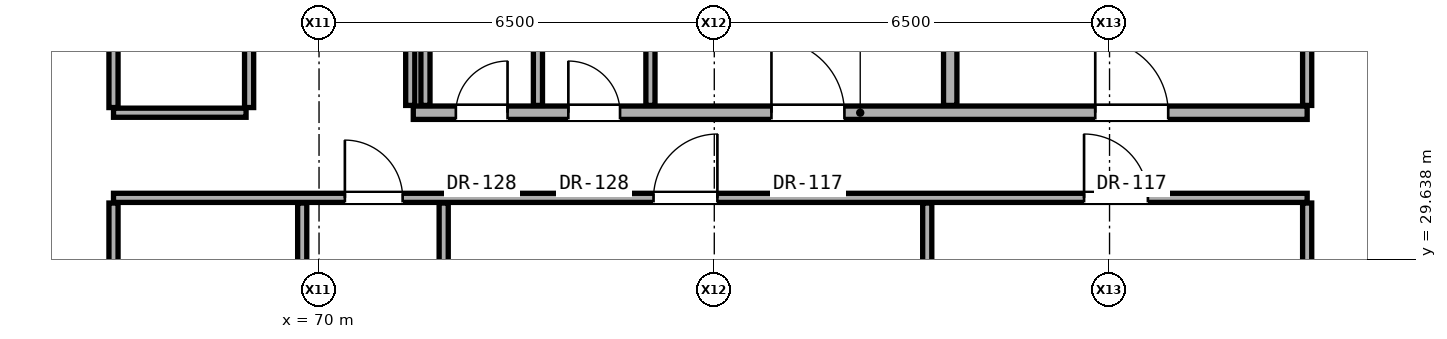
"""IFC4 building model, lengths in metres.
Left out: names, types, materials, properties, quantities, classifications, styles, units other than length and angle.
Written with IfcOpenShell. Run it as: python <this file> out.ifc"""

import sys

from ifc_helpers import new_model, si_unit, direction, frame, frame_2d, origin, place, context, subcontext, project, spatial, rectangle, extrude, element, fill, save


model = new_model("IFC4")
c1 = context("Model", 3, precision=1e-05, world=origin(), true_north=direction((0.0, 1.0)))
c2 = subcontext(c1, "Body", "Model", "MODEL_VIEW")
j1 = project(units=[si_unit("LENGTHUNIT", "METRE"), si_unit("PLANEANGLEUNIT", "RADIAN")], contexts=[c1])
p1 = place(None, origin())
s1 = spatial("IfcSite", under=j1, at=p1, CompositionType="ELEMENT")
p2 = place(p1, origin())
s2 = spatial("IfcBuilding", under=s1, at=p2, CompositionType="ELEMENT")
p3 = place(p2, frame((0.0, 0.0, 78.5)))
s3 = spatial("IfcBuildingStorey", under=s2, at=p3, CompositionType="ELEMENT", Elevation=78.5)
p4 = place(p3, frame((66.62, 30.65, 0.0), z_axis=(0.0, 0.0, 1.0), x_axis=(1.0, 0.0, 0.0)))
e1 = element("IfcWall", 1, at=p4, inside=s3, PredefinedType="PARTITIONING", context=c2, shape_type="SweptSolid", body=[
    extrude(rectangle(XDim=19.63, YDim=0.15, at=frame_2d((9.815, 0.0))), origin(), (0.0, 0.0, 1.0), 2.316),
])
p5 = place(p4, frame((3.805, 0.0, 0.0)))
e2 = element("IfcOpeningElement", 2, at=p5, cuts=e1, PredefinedType="OPENING", context=c2, shape_type="SweptSolid", body=[
    extrude(rectangle(XDim=0.95, YDim=2.15, at=frame_2d((0.475, 1.075))), frame((0.0, 0.085, 0.0), z_axis=(0.0, -1.0, 0.0), x_axis=(1.0, 0.0, 0.0)), (0.0, 0.0, 1.0), 0.17),
])
p6 = place(p4, frame((8.881, 0.0, 0.0)))
e3 = element("IfcOpeningElement", 3, at=p6, cuts=e1, PredefinedType="OPENING", context=c2, shape_type="SweptSolid", body=[
    extrude(rectangle(XDim=1.05, YDim=2.2, at=frame_2d((0.525, 1.1))), frame((0.0, 0.085, 0.0), z_axis=(0.0, -1.0, 0.0), x_axis=(1.0, 0.0, 0.0)), (0.0, 0.0, 1.0), 0.17),
])
p7 = place(p4, frame((15.961, 0.0, 0.0)))
e4 = element("IfcOpeningElement", 4, at=p7, cuts=e1, PredefinedType="OPENING", context=c2, shape_type="SweptSolid", body=[
    extrude(rectangle(XDim=1.05, YDim=2.2, at=frame_2d((0.525, 1.1))), frame((0.0, 0.085, 0.0), z_axis=(0.0, -1.0, 0.0), x_axis=(1.0, 0.0, 0.0)), (0.0, 0.0, 1.0), 0.17),
])
p8 = place(p3, frame((66.62, 32.05, 0.0), z_axis=(0.0, 0.0, 1.0), x_axis=(1.0, 0.0, 0.0)))
e5 = element("IfcWall", 5, at=p8, inside=s3, PredefinedType="PARTITIONING", context=c2, shape_type="SweptSolid", body=[
    extrude(rectangle(XDim=2.18, YDim=0.15, at=frame_2d((1.09, 0.0))), origin(), (0.0, 0.0, 1.0), 2.316),
])
p9 = place(p3, frame((71.55, 32.05, 0.0), z_axis=(0.0, 0.0, 1.0), x_axis=(1.0, 0.0, 0.0)))
e6 = element("IfcWall", 6, at=p9, inside=s3, PredefinedType="SOLIDWALL", context=c2, shape_type="SweptSolid", body=[
    extrude(rectangle(XDim=14.7, YDim=0.22, at=frame_2d((7.35, 0.0))), origin(), (0.0, 0.0, 1.0), 2.316),
])
p10 = place(p9, frame((11.215, 0.0, 0.0)))
e7 = element("IfcOpeningElement", 7, at=p10, cuts=e6, PredefinedType="OPENING", context=c2, shape_type="SweptSolid", body=[
    extrude(rectangle(XDim=1.2, YDim=2.25, at=frame_2d((0.6, 1.125))), frame((0.0, 0.12, 0.0), z_axis=(0.0, -1.0, 0.0), x_axis=(1.0, 0.0, 0.0)), (0.0, 0.0, 1.0), 0.24),
])
p11 = place(p9, frame((5.89, 0.0, 0.0)))
e8 = element("IfcOpeningElement", 8, at=p11, cuts=e6, PredefinedType="OPENING", context=c2, shape_type="SweptSolid", body=[
    extrude(rectangle(XDim=1.2, YDim=2.25, at=frame_2d((0.6, 1.125))), frame((0.0, 0.12, 0.0), z_axis=(0.0, -1.0, 0.0), x_axis=(1.0, 0.0, 0.0)), (0.0, 0.0, 1.0), 0.24),
])
p12 = place(p9, frame((0.7, 0.0, 0.0)))
e9 = element("IfcOpeningElement", 9, at=p12, cuts=e6, PredefinedType="OPENING", context=c2, shape_type="SweptSolid", body=[
    extrude(rectangle(XDim=0.85, YDim=2.01, at=frame_2d((0.425, 1.005))), frame((0.0, 0.12, 0.0), z_axis=(0.0, -1.0, 0.0), x_axis=(1.0, 0.0, 0.0)), (0.0, 0.0, 1.0), 0.24),
])
p13 = place(p9, frame((2.55, 0.0, 0.0)))
e10 = element("IfcOpeningElement", 10, at=p13, cuts=e6, PredefinedType="OPENING", context=c2, shape_type="SweptSolid", body=[
    extrude(rectangle(XDim=0.85, YDim=2.01, at=frame_2d((0.425, 1.005))), frame((0.0, 0.12, 0.0), z_axis=(0.0, -1.0, 0.0), x_axis=(1.0, 0.0, 0.0)), (0.0, 0.0, 1.0), 0.24),
])
p14 = place(p3, frame((66.62, 24.935, 0.0), z_axis=(0.0, 0.0, 1.0), x_axis=(0.0, 1.0, 0.0)))
e11 = element("IfcWall", 11, at=p14, inside=s3, PredefinedType="PARTITIONING", context=c2, shape_type="SweptSolid", body=[
    extrude(rectangle(XDim=5.63, YDim=0.15, at=frame_2d((2.815, 0.0))), origin(), (0.0, 0.0, 1.0), 2.316),
])
p15 = place(p14, frame((2.34, 0.0, 0.0)))
e12 = element("IfcOpeningElement", 12, at=p15, cuts=e11, PredefinedType="OPENING", context=c2, shape_type="SweptSolid", body=[
    extrude(rectangle(XDim=0.95, YDim=2.15, at=frame_2d((0.475, 1.075))), frame((0.0, 0.085, 0.0), z_axis=(0.0, -1.0, 0.0), x_axis=(1.0, 0.0, 0.0)), (0.0, 0.0, 1.0), 0.17),
])
p16 = place(p3, frame((66.62, 32.135, 0.0), z_axis=(0.0, 0.0, 1.0), x_axis=(0.0, 1.0, 0.0)))
e13 = element("IfcWall", 13, at=p16, inside=s3, PredefinedType="PARTITIONING", context=c2, shape_type="SweptSolid", body=[
    extrude(rectangle(XDim=3.48, YDim=0.15, at=frame_2d((1.74, 0.0))), origin(), (0.0, 0.0, 1.0), 2.332),
])
p17 = place(p3, frame((68.85, 32.135, 0.0), z_axis=(0.0, 0.0, 1.0), x_axis=(0.0, 1.0, 0.0)))
e14 = element("IfcWall", 14, at=p17, inside=s3, PredefinedType="PARTITIONING", context=c2, shape_type="SweptSolid", body=[
    extrude(rectangle(XDim=2.745, YDim=0.15, at=frame_2d((1.373, 0.0))), origin(), (0.0, 0.0, 1.0), 2.94),
])
p18 = place(p3, frame((69.723, 24.935, 0.0), z_axis=(0.0, 0.0, 1.0), x_axis=(0.0, 1.0, 0.0)))
e15 = element("IfcWall", 15, at=p18, inside=s3, PredefinedType="PARTITIONING", context=c2, shape_type="SweptSolid", body=[
    extrude(rectangle(XDim=5.63, YDim=0.15, at=frame_2d((2.815, 0.0))), origin(), (0.0, 0.0, 1.0), 2.316),
])
for number, where, z_axis, x_axis in (
    (16, (71.5, 32.17, 0.0), (0.0, 0.0, 1.0), (0.0, 1.0, 0.0)),
    (17, (71.75, 32.17, 0.0), (0.0, 0.0, 1.0), (0.0, 1.0, 0.0)),
):
    element("IfcWall", number, at=place(p3, frame(where, z_axis=z_axis, x_axis=x_axis)), inside=s3, PredefinedType="PARTITIONING", context=c2, shape_type="SweptSolid", body=[
        extrude(rectangle(XDim=2.71, YDim=0.15, at=frame_2d((1.355, 0.0))), origin(), (0.0, 0.0, 1.0), 2.94),
    ])
p19 = place(p3, frame((72.05, 26.17, 0.0), z_axis=(0.0, 0.0, 1.0), x_axis=(0.0, 1.0, 0.0)))
e18 = element("IfcWall", 18, at=p19, inside=s3, PredefinedType="PARTITIONING", context=c2, shape_type="SweptSolid", body=[
    extrude(rectangle(XDim=4.395, YDim=0.15, at=frame_2d((2.198, 0.0))), origin(), (0.0, 0.0, 1.0), 2.316),
])
for number, where, z_axis, x_axis in (
    (19, (73.6, 32.17, 0.0), (0.0, 0.0, 1.0), (0.0, 1.0, 0.0)),
    (20, (75.45, 32.17, 0.0), (0.0, 0.0, 1.0), (0.0, 1.0, 0.0)),
):
    element("IfcWall", number, at=place(p3, frame(where, z_axis=z_axis, x_axis=x_axis)), inside=s3, PredefinedType="PARTITIONING", context=c2, shape_type="SweptSolid", body=[
        extrude(rectangle(XDim=2.71, YDim=0.15, at=frame_2d((1.355, 0.0))), origin(), (0.0, 0.0, 1.0), 2.94),
    ])
p20 = place(p3, frame((80.002, 26.17, 0.0), z_axis=(0.0, 0.0, 1.0), x_axis=(0.0, 1.0, 0.0)))
e21 = element("IfcWall", 21, at=p20, inside=s3, PredefinedType="PARTITIONING", context=c2, shape_type="SweptSolid", body=[
    extrude(rectangle(XDim=4.395, YDim=0.15, at=frame_2d((2.198, 0.0))), origin(), (0.0, 0.0, 1.0), 2.316),
])
p21 = place(p3, frame((80.38, 32.17, 0.0), z_axis=(0.0, 0.0, 1.0), x_axis=(0.0, 1.0, 0.0)))
e22 = element("IfcWall", 22, at=p21, inside=s3, PredefinedType="SOLIDWALL", context=c2, shape_type="SweptSolid", body=[
    extrude(rectangle(XDim=2.71, YDim=0.22, at=frame_2d((1.355, 0.0))), origin(), (0.0, 0.0, 1.0), 2.94),
])
p22 = place(p3, frame((86.25, 26.17, 0.0), z_axis=(0.0, 0.0, 1.0), x_axis=(0.0, 1.0, 0.0)))
e23 = element("IfcWall", 23, at=p22, inside=s3, PredefinedType="PARTITIONING", context=c2, shape_type="SweptSolid", body=[
    extrude(rectangle(XDim=4.395, YDim=0.15, at=frame_2d((2.198, 0.0))), origin(), (0.0, 0.0, 1.0), 2.316),
])
p23 = place(p3, frame((86.25, 32.17, 0.0), z_axis=(0.0, 0.0, 1.0), x_axis=(0.0, 1.0, 0.0)))
e24 = element("IfcWall", 24, at=p23, inside=s3, PredefinedType="PARTITIONING", context=c2, shape_type="SweptSolid", body=[
    extrude(rectangle(XDim=2.795, YDim=0.15, at=frame_2d((1.397, 0.0))), origin(), (0.0, 0.0, 1.0), 2.332),
])
p24 = place(p10, origin())
e25 = element("IfcDoor", 25, at=p24, inside=s3, OperationType="SINGLE_SWING_LEFT", PredefinedType="DOOR", context=c2, shape_type="SweptSolid", body=[
    extrude(rectangle(XDim=1.2, YDim=2.25, at=frame_2d((0.6, 1.125))), frame((0.0, 0.025, 0.0), z_axis=(0.0, -1.0, 0.0), x_axis=(1.0, 0.0, 0.0)), (0.0, 0.0, 1.0), 0.05),
])
fill(e7, e25)
p25 = place(p11, origin())
e26 = element("IfcDoor", 26, at=p25, inside=s3, OperationType="SINGLE_SWING_LEFT", PredefinedType="DOOR", context=c2, shape_type="SweptSolid", body=[
    extrude(rectangle(XDim=1.2, YDim=2.25, at=frame_2d((0.6, 1.125))), frame((0.0, 0.025, 0.0), z_axis=(0.0, -1.0, 0.0), x_axis=(1.0, 0.0, 0.0)), (0.0, 0.0, 1.0), 0.05),
])
fill(e8, e26)
p26 = place(p12, origin())
e27 = element("IfcDoor", 27, at=p26, inside=s3, OperationType="SINGLE_SWING_RIGHT", PredefinedType="DOOR", context=c2, shape_type="SweptSolid", body=[
    extrude(rectangle(XDim=0.85, YDim=2.01, at=frame_2d((0.425, 1.005))), frame((0.0, 0.025, 0.0), z_axis=(0.0, -1.0, 0.0), x_axis=(1.0, 0.0, 0.0)), (0.0, 0.0, 1.0), 0.05),
])
fill(e9, e27)
p27 = place(p13, origin())
e28 = element("IfcDoor", 28, at=p27, inside=s3, OperationType="SINGLE_SWING_LEFT", PredefinedType="DOOR", context=c2, shape_type="SweptSolid", body=[
    extrude(rectangle(XDim=0.85, YDim=2.01, at=frame_2d((0.425, 1.005))), frame((0.0, 0.025, 0.0), z_axis=(0.0, -1.0, 0.0), x_axis=(1.0, 0.0, 0.0)), (0.0, 0.0, 1.0), 0.05),
])
fill(e10, e28)
p28 = place(p5, origin())
e29 = element("IfcDoor", 29, at=p28, inside=s3, OperationType="SINGLE_SWING_LEFT", PredefinedType="DOOR", context=c2, shape_type="SweptSolid", body=[
    extrude(rectangle(XDim=0.95, YDim=2.15, at=frame_2d((0.475, 1.075))), frame((0.0, 0.025, 0.0), z_axis=(0.0, -1.0, 0.0), x_axis=(1.0, 0.0, 0.0)), (0.0, 0.0, 1.0), 0.05),
])
fill(e2, e29)
p29 = place(p6, origin())
e30 = element("IfcDoor", 30, at=p29, inside=s3, OperationType="SINGLE_SWING_RIGHT", PredefinedType="DOOR", context=c2, shape_type="SweptSolid", body=[
    extrude(rectangle(XDim=1.05, YDim=2.2, at=frame_2d((0.525, 1.1))), frame((0.0, 0.025, 0.0), z_axis=(0.0, -1.0, 0.0), x_axis=(1.0, 0.0, 0.0)), (0.0, 0.0, 1.0), 0.05),
])
fill(e3, e30)
p30 = place(p7, origin())
e31 = element("IfcDoor", 31, at=p30, inside=s3, OperationType="SINGLE_SWING_LEFT", PredefinedType="DOOR", context=c2, shape_type="SweptSolid", body=[
    extrude(rectangle(XDim=1.05, YDim=2.2, at=frame_2d((0.525, 1.1))), frame((0.0, 0.025, 0.0), z_axis=(0.0, -1.0, 0.0), x_axis=(1.0, 0.0, 0.0)), (0.0, 0.0, 1.0), 0.05),
])
fill(e4, e31)
save(model, sys.argv[1])
